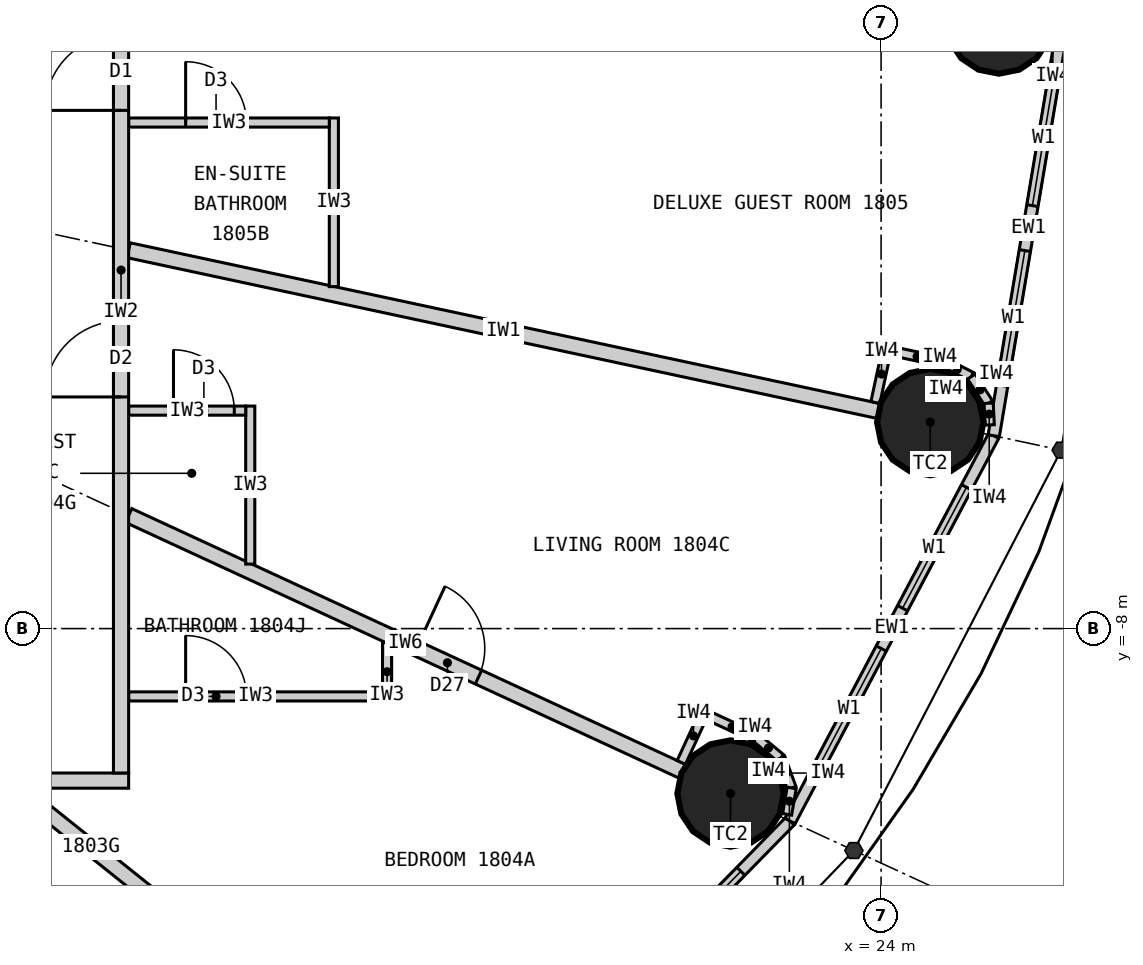
"""IFC4 building model, lengths in metres.
Left out: names, types, materials, properties, quantities, classifications, styles, units other than length and angle.
Written with IfcOpenShell. Run it as: python <this file> out.ifc"""

import sys

from ifc_helpers import new_model, si_unit, direction, frame, frame_2d, origin, origin_2d, place, context, subcontext, project, spatial, rectangle, circle, extrude, element, fill, save


model = new_model("IFC4")
c1 = context("Model", 3, precision=1e-05, world=origin(), true_north=direction((0.0, 1.0)))
c2 = subcontext(c1, "Body", "Model", "MODEL_VIEW")
j1 = project(units=[si_unit("LENGTHUNIT", "METRE"), si_unit("PLANEANGLEUNIT", "RADIAN")], contexts=[c1])
p1 = place(None, origin())
s1 = spatial("IfcSite", under=j1, at=p1, CompositionType="ELEMENT")
p2 = place(p1, origin())
s2 = spatial("IfcBuilding", under=s1, at=p2, CompositionType="ELEMENT")
p3 = place(p2, frame((0.0, 0.0, 73.8)))
s3 = spatial("IfcBuildingStorey", under=s2, at=p3, CompositionType="ELEMENT", Elevation=73.8)
for number, where, z_axis, x_axis in (
    (1, (25.55, 0.0, 0.0), (0.0, 0.0, 1.0), (1.0, 0.0, 0.0)),
    (2, (22.019, -10.17, 0.0), (0.0, 0.0, 1.0), (1.0, 0.0, 0.0)),
    (3, (24.647, -5.283, 0.0), (0.0, 0.0, 1.0), (1.0, 0.0, 0.0)),
):
    element("IfcColumn", number, at=place(p3, frame(where, z_axis=z_axis, x_axis=x_axis)), inside=s3, PredefinedType="COLUMN", context=c2, shape_type="SweptSolid", body=[
        extrude(circle(Radius=0.7, at=origin_2d()), origin(), (0.0, 0.0, 1.0), 3.3),
    ])
p4 = place(p3, frame((18.57, -14.856, 0.0), z_axis=(0.0, 0.0, 1.0), x_axis=(0.699602905915, 0.714531856557, 0.0)))
e4 = element("IfcWall", 4, at=p4, inside=s3, PredefinedType="ELEMENTEDWALL", context=c2, shape_type="SweptSolid", body=[
    extrude(rectangle(XDim=6.051, YDim=0.15, at=frame_2d((3.025, 0.0))), origin(), (0.0, 0.0, 1.0), 3.12),
])
p5 = place(p4, frame((0.926, 0.0, 0.9)))
e5 = element("IfcOpeningElement", 5, at=p5, cuts=e4, PredefinedType="OPENING", context=c2, shape_type="SweptSolid", body=[
    extrude(rectangle(XDim=1.8, YDim=1.9, at=frame_2d((0.9, 0.95))), frame((0.0, 0.085, 0.0), z_axis=(0.0, -1.0, 0.0), x_axis=(1.0, 0.0, 0.0)), (0.0, 0.0, 1.0), 0.17),
])
p6 = place(p4, frame((3.325, 0.0, 0.9)))
e6 = element("IfcOpeningElement", 6, at=p6, cuts=e4, PredefinedType="OPENING", context=c2, shape_type="SweptSolid", body=[
    extrude(rectangle(XDim=1.8, YDim=1.9, at=frame_2d((0.9, 0.95))), frame((0.0, 0.085, 0.0), z_axis=(0.0, -1.0, 0.0), x_axis=(1.0, 0.0, 0.0)), (0.0, 0.0, 1.0), 0.17),
])
p7 = place(p3, frame((22.803, -10.532, 0.0), z_axis=(0.0, 0.0, 1.0), x_axis=(0.467296867008, 0.884100468321, 0.0)))
e7 = element("IfcWall", 7, at=p7, inside=s3, PredefinedType="ELEMENTEDWALL", context=c2, shape_type="SweptSolid", body=[
    extrude(rectangle(XDim=5.734, YDim=0.15, at=frame_2d((2.867, 0.0))), origin(), (0.0, 0.0, 1.0), 3.12),
])
p8 = place(p7, frame((0.767, 0.0, 0.9)))
e8 = element("IfcOpeningElement", 8, at=p8, cuts=e7, PredefinedType="OPENING", context=c2, shape_type="SweptSolid", body=[
    extrude(rectangle(XDim=1.8, YDim=1.9, at=frame_2d((0.9, 0.95))), frame((0.0, 0.085, 0.0), z_axis=(0.0, -1.0, 0.0), x_axis=(1.0, 0.0, 0.0)), (0.0, 0.0, 1.0), 0.17),
])
p9 = place(p7, frame((3.167, 0.0, 0.9)))
e9 = element("IfcOpeningElement", 9, at=p9, cuts=e7, PredefinedType="OPENING", context=c2, shape_type="SweptSolid", body=[
    extrude(rectangle(XDim=1.8, YDim=1.9, at=frame_2d((0.9, 0.95))), frame((0.0, 0.085, 0.0), z_axis=(0.0, -1.0, 0.0), x_axis=(1.0, 0.0, 0.0)), (0.0, 0.0, 1.0), 0.17),
])
p10 = place(p3, frame((25.482, -5.462, 0.0), z_axis=(0.0, 0.0, 1.0), x_axis=(0.165642551694, 0.986185857264, 0.0)))
e10 = element("IfcWall", 10, at=p10, inside=s3, PredefinedType="ELEMENTEDWALL", context=c2, shape_type="SweptSolid", body=[
    extrude(rectangle(XDim=5.539, YDim=0.15, at=frame_2d((2.77, 0.0))), origin(), (0.0, 0.0, 1.0), 3.12),
])
p11 = place(p10, frame((0.669, 0.0, 0.9)))
e11 = element("IfcOpeningElement", 11, at=p11, cuts=e10, PredefinedType="OPENING", context=c2, shape_type="SweptSolid", body=[
    extrude(rectangle(XDim=1.8, YDim=1.9, at=frame_2d((0.9, 0.95))), frame((0.0, 0.085, 0.0), z_axis=(0.0, -1.0, 0.0), x_axis=(1.0, 0.0, 0.0)), (0.0, 0.0, 1.0), 0.17),
])
p12 = place(p10, frame((3.07, 0.0, 0.9)))
e12 = element("IfcOpeningElement", 12, at=p12, cuts=e10, PredefinedType="OPENING", context=c2, shape_type="SweptSolid", body=[
    extrude(rectangle(XDim=1.8, YDim=1.9, at=frame_2d((0.9, 0.95))), frame((0.0, 0.085, 0.0), z_axis=(0.0, -1.0, 0.0), x_axis=(1.0, 0.0, 0.0)), (0.0, 0.0, 1.0), 0.17),
])
p13 = place(p3, frame((14.1, -10.0, 0.0), z_axis=(0.0, 0.0, 1.0), x_axis=(-1.0, 0.0, 0.0)))
e13 = element("IfcWall", 13, at=p13, inside=s3, PredefinedType="PARTITIONING", context=c2, shape_type="SweptSolid", body=[
    extrude(rectangle(XDim=28.2, YDim=0.2, at=frame_2d((14.1, 0.0))), origin(), (0.0, 0.0, 1.0), 3.12),
])
p14 = place(p13, frame((24.165, 0.0, 0.0)))
e14 = element("IfcOpeningElement", 14, at=p14, cuts=e13, PredefinedType="OPENING", context=c2, shape_type="SweptSolid", body=[
    extrude(rectangle(XDim=1.0, YDim=2.2, at=frame_2d((0.5, 1.1))), frame((0.0, 0.11, 0.0), z_axis=(0.0, -1.0, 0.0), x_axis=(1.0, 0.0, 0.0)), (0.0, 0.0, 1.0), 0.22),
])
p15 = place(p13, frame((14.923, 0.0, 0.0)))
e15 = element("IfcOpeningElement", 15, at=p15, cuts=e13, PredefinedType="OPENING", context=c2, shape_type="SweptSolid", body=[
    extrude(rectangle(XDim=1.0, YDim=2.2, at=frame_2d((0.5, 1.1))), frame((0.0, 0.11, 0.0), z_axis=(0.0, -1.0, 0.0), x_axis=(1.0, 0.0, 0.0)), (0.0, 0.0, 1.0), 0.22),
])
p16 = place(p13, frame((3.035, 0.0, 0.0)))
e16 = element("IfcOpeningElement", 16, at=p16, cuts=e13, PredefinedType="OPENING", context=c2, shape_type="SweptSolid", body=[
    extrude(rectangle(XDim=1.0, YDim=2.2, at=frame_2d((0.5, 1.1))), frame((0.0, 0.11, 0.0), z_axis=(0.0, -1.0, 0.0), x_axis=(1.0, 0.0, 0.0)), (0.0, 0.0, 1.0), 0.22),
])
p17 = place(p3, frame((12.625, -10.1, 0.0), z_axis=(0.0, 0.0, 1.0), x_axis=(0.780892451574, -0.624665493744, 0.0)))
e17 = element("IfcWall", 17, at=p17, inside=s3, PredefinedType="PARTITIONING", context=c2, shape_type="SweptSolid", body=[
    extrude(rectangle(XDim=6.045, YDim=0.2, at=frame_2d((3.022, 0.0))), origin(), (0.0, 0.0, 1.0), 2.32),
])
p18 = place(p3, frame((14.1, -6.512, 0.0), z_axis=(0.0, 0.0, 1.0), x_axis=(0.907832871056, -0.419332181247, 0.0)))
e18 = element("IfcWall", 18, at=p18, inside=s3, PredefinedType="PARTITIONING", context=c2, shape_type="SweptSolid", body=[
    extrude(rectangle(XDim=8.023, YDim=0.2, at=frame_2d((4.011, 0.0))), origin(), (0.0, 0.0, 1.0), 2.32),
])
p19 = place(p18, frame((4.17, 0.0, 0.0)))
e19 = element("IfcOpeningElement", 19, at=p19, cuts=e18, PredefinedType="OPENING", context=c2, shape_type="SweptSolid", body=[
    extrude(rectangle(XDim=0.9, YDim=2.1, at=frame_2d((0.45, 1.05))), frame((0.0, 0.11, 0.0), z_axis=(0.0, -1.0, 0.0), x_axis=(1.0, 0.0, 0.0)), (0.0, 0.0, 1.0), 0.22),
])
p20 = place(p3, frame((14.1, -3.022, 0.0), z_axis=(0.0, 0.0, 1.0), x_axis=(0.977790014929, -0.209586943072, 0.0)))
e20 = element("IfcWall", 20, at=p20, inside=s3, PredefinedType="PARTITIONING", context=c2, shape_type="SweptSolid", body=[
    extrude(rectangle(XDim=10.087, YDim=0.2, at=frame_2d((5.043, 0.0))), origin(), (0.0, 0.0, 1.0), 2.32),
])
p21 = place(p3, frame((17.5, -8.183, 0.0), z_axis=(0.0, 0.0, 1.0), x_axis=(0.0, -1.0, 0.0)))
e21 = element("IfcWall", 21, at=p21, inside=s3, PredefinedType="PARTITIONING", context=c2, shape_type="SweptSolid", body=[
    extrude(rectangle(XDim=0.77, YDim=0.12, at=frame_2d((0.385, 0.0))), origin(), (0.0, 0.0, 1.0), 3.12),
])
p22 = place(p3, frame((14.1, -8.893, 0.0), z_axis=(0.0, 0.0, 1.0), x_axis=(1.0, 0.0, 0.0)))
e22 = element("IfcWall", 22, at=p22, inside=s3, PredefinedType="PARTITIONING", context=c2, shape_type="SweptSolid", body=[
    extrude(rectangle(XDim=3.34, YDim=0.12, at=frame_2d((1.67, 0.0))), origin(), (0.0, 0.0, 1.0), 3.12),
])
p23 = place(p22, frame((0.75, 0.0, 0.0)))
e23 = element("IfcOpeningElement", 23, at=p23, cuts=e22, PredefinedType="OPENING", context=c2, shape_type="SweptSolid", body=[
    extrude(rectangle(XDim=0.8, YDim=2.1, at=frame_2d((0.4, 1.05))), frame((0.0, 0.07, 0.0), z_axis=(0.0, -1.0, 0.0), x_axis=(1.0, 0.0, 0.0)), (0.0, 0.0, 1.0), 0.14),
])
p24 = place(p3, frame((15.7, -7.152, 0.0), z_axis=(0.0, 0.0, 1.0), x_axis=(0.0, 1.0, 0.0)))
e24 = element("IfcWall", 24, at=p24, inside=s3, PredefinedType="PARTITIONING", context=c2, shape_type="SweptSolid", body=[
    extrude(rectangle(XDim=2.079, YDim=0.12, at=frame_2d((1.04, 0.0))), origin(), (0.0, 0.0, 1.0), 3.12),
])
p25 = place(p3, frame((14.1, -5.133, 0.0), z_axis=(0.0, 0.0, 1.0), x_axis=(1.0, 0.0, 0.0)))
e25 = element("IfcWall", 25, at=p25, inside=s3, PredefinedType="PARTITIONING", context=c2, shape_type="SweptSolid", body=[
    extrude(rectangle(XDim=1.54, YDim=0.12, at=frame_2d((0.77, 0.0))), origin(), (0.0, 0.0, 1.0), 3.12),
])
p26 = place(p25, frame((0.59, 0.0, 0.0)))
e26 = element("IfcOpeningElement", 26, at=p26, cuts=e25, PredefinedType="OPENING", context=c2, shape_type="SweptSolid", body=[
    extrude(rectangle(XDim=0.8, YDim=2.1, at=frame_2d((0.4, 1.05))), frame((0.0, 0.07, 0.0), z_axis=(0.0, -1.0, 0.0), x_axis=(1.0, 0.0, 0.0)), (0.0, 0.0, 1.0), 0.14),
])
p27 = place(p3, frame((16.8, -3.501, 0.0), z_axis=(0.0, 0.0, 1.0), x_axis=(0.0, 1.0, 0.0)))
e27 = element("IfcWall", 27, at=p27, inside=s3, PredefinedType="PARTITIONING", context=c2, shape_type="SweptSolid", body=[
    extrude(rectangle(XDim=2.219, YDim=0.12, at=frame_2d((1.109, 0.0))), origin(), (0.0, 0.0, 1.0), 3.12),
])
p28 = place(p3, frame((14.1, -1.343, 0.0), z_axis=(0.0, 0.0, 1.0), x_axis=(1.0, 0.0, 0.0)))
e28 = element("IfcWall", 28, at=p28, inside=s3, PredefinedType="PARTITIONING", context=c2, shape_type="SweptSolid", body=[
    extrude(rectangle(XDim=2.64, YDim=0.12, at=frame_2d((1.32, 0.0))), origin(), (0.0, 0.0, 1.0), 3.12),
])
p29 = place(p28, frame((0.75, 0.0, 0.0)))
e29 = element("IfcOpeningElement", 29, at=p29, cuts=e28, PredefinedType="OPENING", context=c2, shape_type="SweptSolid", body=[
    extrude(rectangle(XDim=0.8, YDim=2.1, at=frame_2d((0.4, 1.05))), frame((0.0, 0.07, 0.0), z_axis=(0.0, -1.0, 0.0), x_axis=(1.0, 0.0, 0.0)), (0.0, 0.0, 1.0), 0.14),
])
p30 = place(p3, frame((14.0, -9.9, 0.0), z_axis=(0.0, 0.0, 1.0), x_axis=(0.0, 1.0, 0.0)))
e30 = element("IfcWall", 30, at=p30, inside=s3, PredefinedType="PARTITIONING", context=c2, shape_type="SweptSolid", body=[
    extrude(rectangle(XDim=13.232, YDim=0.2, at=frame_2d((6.616, 0.0))), origin(), (0.0, 0.0, 1.0), 3.12),
])
p31 = place(p30, frame((4.948, 0.0, 0.0)))
e31 = element("IfcOpeningElement", 31, at=p31, cuts=e30, PredefinedType="OPENING", context=c2, shape_type="SweptSolid", body=[
    extrude(rectangle(XDim=1.0, YDim=2.2, at=frame_2d((0.5, 1.1))), frame((0.0, 0.11, 0.0), z_axis=(0.0, -1.0, 0.0), x_axis=(1.0, 0.0, 0.0)), (0.0, 0.0, 1.0), 0.22),
])
p32 = place(p30, frame((8.718, 0.0, 0.0)))
e32 = element("IfcOpeningElement", 32, at=p32, cuts=e30, PredefinedType="OPENING", context=c2, shape_type="SweptSolid", body=[
    extrude(rectangle(XDim=1.0, YDim=2.2, at=frame_2d((0.5, 1.1))), frame((0.0, 0.11, 0.0), z_axis=(0.0, -1.0, 0.0), x_axis=(1.0, 0.0, 0.0)), (0.0, 0.0, 1.0), 0.22),
])
p33 = place(p30, frame((11.74, 0.0, 0.0)))
e33 = element("IfcOpeningElement", 33, at=p33, cuts=e30, PredefinedType="OPENING", context=c2, shape_type="SweptSolid", body=[
    extrude(rectangle(XDim=1.0, YDim=2.2, at=frame_2d((0.5, 1.1))), frame((0.0, 0.11, 0.0), z_axis=(0.0, -1.0, 0.0), x_axis=(1.0, 0.0, 0.0)), (0.0, 0.0, 1.0), 0.22),
])
p34 = place(p3, frame((21.371, -9.761, 0.0), z_axis=(0.0, 0.0, 1.0), x_axis=(0.419259891039, 0.907866258744, 0.0)))
e34 = element("IfcWall", 34, at=p34, inside=s3, PredefinedType="PARTITIONING", context=c2, shape_type="SweptSolid", body=[
    extrude(rectangle(XDim=0.768, YDim=0.12, at=frame_2d((0.384, 0.0))), origin(), (0.0, 0.0, 1.0), 3.12),
])
p35 = place(p3, frame((21.722, -9.144, 0.0), z_axis=(0.0, 0.0, 1.0), x_axis=(0.907877701396, -0.419235112208, 0.0)))
e35 = element("IfcWall", 35, at=p35, inside=s3, PredefinedType="PARTITIONING", context=c2, shape_type="SweptSolid", body=[
    extrude(rectangle(XDim=0.7, YDim=0.12, at=frame_2d((0.35, 0.0))), origin(), (0.0, 0.0, 1.0), 3.12),
])
p36 = place(p3, frame((22.358, -9.437, 0.0), z_axis=(0.0, 0.0, 1.0), x_axis=(0.768412687942, -0.639954639806, 0.0)))
e36 = element("IfcWall", 36, at=p36, inside=s3, PredefinedType="PARTITIONING", context=c2, shape_type="SweptSolid", body=[
    extrude(rectangle(XDim=0.418, YDim=0.12, at=frame_2d((0.209, 0.0))), origin(), (0.0, 0.0, 1.0), 3.12),
])
p37 = place(p3, frame((22.679, -9.705, 0.0), z_axis=(0.0, 0.0, 1.0), x_axis=(0.345164001646, -0.938542386879, 0.0)))
e37 = element("IfcWall", 37, at=p37, inside=s3, PredefinedType="PARTITIONING", context=c2, shape_type="SweptSolid", body=[
    extrude(rectangle(XDim=0.418, YDim=0.12, at=frame_2d((0.209, 0.0))), origin(), (0.0, 0.0, 1.0), 3.12),
])
p38 = place(p3, frame((22.823, -10.097, 0.0), z_axis=(0.0, 0.0, 1.0), x_axis=(-0.169674995186, -0.985500074079, 0.0)))
e38 = element("IfcWall", 38, at=p38, inside=s3, PredefinedType="PARTITIONING", context=c2, shape_type="SweptSolid", body=[
    extrude(rectangle(XDim=0.353, YDim=0.12, at=frame_2d((0.176, 0.0))), origin(), (0.0, 0.0, 1.0), 3.12),
])
p39 = place(p3, frame((23.925, -5.026, 0.0), z_axis=(0.0, 0.0, 1.0), x_axis=(0.209681192172, 0.977769808109, 0.0)))
e39 = element("IfcWall", 39, at=p39, inside=s3, PredefinedType="PARTITIONING", context=c2, shape_type="SweptSolid", body=[
    extrude(rectangle(XDim=0.767, YDim=0.12, at=frame_2d((0.384, 0.0))), origin(), (0.0, 0.0, 1.0), 3.12),
])
p40 = place(p3, frame((24.132, -4.347, 0.0), z_axis=(0.0, 0.0, 1.0), x_axis=(0.977776882509, -0.209648200638, 0.0)))
e40 = element("IfcWall", 40, at=p40, inside=s3, PredefinedType="PARTITIONING", context=c2, shape_type="SweptSolid", body=[
    extrude(rectangle(XDim=0.7, YDim=0.12, at=frame_2d((0.35, 0.0))), origin(), (0.0, 0.0, 1.0), 3.12),
])
for number, where, z_axis, x_axis in (
    (41, (24.816, -4.494, 0.0), (0.0, 0.0, 1.0), (0.89, -0.455, 0.0)),
    (42, (25.188, -4.684, 0.0), (0.0, 0.0, 1.0), (0.543, -0.84, 0.0)),
):
    element("IfcWall", number, at=place(p3, frame(where, z_axis=z_axis, x_axis=x_axis)), inside=s3, PredefinedType="PARTITIONING", context=c2, shape_type="SweptSolid", body=[
        extrude(rectangle(XDim=0.418, YDim=0.12, at=frame_2d((0.209, 0.0))), origin(), (0.0, 0.0, 1.0), 3.12),
    ])
p41 = place(p3, frame((25.416, -5.035, 0.0), z_axis=(0.0, 0.0, 1.0), x_axis=(0.050406329159, -0.998728793007, 0.0)))
e43 = element("IfcWall", 43, at=p41, inside=s3, PredefinedType="PARTITIONING", context=c2, shape_type="SweptSolid", body=[
    extrude(rectangle(XDim=0.286, YDim=0.12, at=frame_2d((0.143, 0.0))), origin(), (0.0, 0.0, 1.0), 3.12),
])
p42 = place(p6, origin())
e44 = element("IfcWindow", 44, at=p42, inside=s3, PartitioningType="SINGLE_PANEL", PredefinedType="WINDOW", context=c2, shape_type="SweptSolid", body=[
    extrude(rectangle(XDim=1.8, YDim=1.9, at=frame_2d((0.9, 0.95))), frame((0.0, 0.03, 0.0), z_axis=(0.0, -1.0, 0.0), x_axis=(1.0, 0.0, 0.0)), (0.0, 0.0, 1.0), 0.06),
])
fill(e6, e44)
p43 = place(p8, origin())
e45 = element("IfcWindow", 45, at=p43, inside=s3, PartitioningType="SINGLE_PANEL", PredefinedType="WINDOW", context=c2, shape_type="SweptSolid", body=[
    extrude(rectangle(XDim=1.8, YDim=1.9, at=frame_2d((0.9, 0.95))), frame((0.0, 0.03, 0.0), z_axis=(0.0, -1.0, 0.0), x_axis=(1.0, 0.0, 0.0)), (0.0, 0.0, 1.0), 0.06),
])
fill(e8, e45)
p44 = place(p9, origin())
e46 = element("IfcWindow", 46, at=p44, inside=s3, PartitioningType="SINGLE_PANEL", PredefinedType="WINDOW", context=c2, shape_type="SweptSolid", body=[
    extrude(rectangle(XDim=1.8, YDim=1.9, at=frame_2d((0.9, 0.95))), frame((0.0, 0.03, 0.0), z_axis=(0.0, -1.0, 0.0), x_axis=(1.0, 0.0, 0.0)), (0.0, 0.0, 1.0), 0.06),
])
fill(e9, e46)
p45 = place(p11, origin())
e47 = element("IfcWindow", 47, at=p45, inside=s3, PartitioningType="SINGLE_PANEL", PredefinedType="WINDOW", context=c2, shape_type="SweptSolid", body=[
    extrude(rectangle(XDim=1.8, YDim=1.9, at=frame_2d((0.9, 0.95))), frame((0.0, 0.03, 0.0), z_axis=(0.0, -1.0, 0.0), x_axis=(1.0, 0.0, 0.0)), (0.0, 0.0, 1.0), 0.06),
])
fill(e11, e47)
p46 = place(p12, origin())
e48 = element("IfcWindow", 48, at=p46, inside=s3, PartitioningType="SINGLE_PANEL", PredefinedType="WINDOW", context=c2, shape_type="SweptSolid", body=[
    extrude(rectangle(XDim=1.8, YDim=1.9, at=frame_2d((0.9, 0.95))), frame((0.0, 0.03, 0.0), z_axis=(0.0, -1.0, 0.0), x_axis=(1.0, 0.0, 0.0)), (0.0, 0.0, 1.0), 0.06),
])
fill(e12, e48)
p47 = place(p23, origin())
e49 = element("IfcDoor", 49, at=p47, inside=s3, OperationType="SINGLE_SWING_LEFT", PredefinedType="DOOR", context=c2, shape_type="SweptSolid", body=[
    extrude(rectangle(XDim=0.8, YDim=2.1, at=frame_2d((0.4, 1.05))), frame((0.0, 0.025, 0.0), z_axis=(0.0, -1.0, 0.0), x_axis=(1.0, 0.0, 0.0)), (0.0, 0.0, 1.0), 0.05),
])
fill(e23, e49)
p48 = place(p26, origin())
e50 = element("IfcDoor", 50, at=p48, inside=s3, OperationType="SINGLE_SWING_LEFT", PredefinedType="DOOR", context=c2, shape_type="SweptSolid", body=[
    extrude(rectangle(XDim=0.8, YDim=2.1, at=frame_2d((0.4, 1.05))), frame((0.0, 0.025, 0.0), z_axis=(0.0, -1.0, 0.0), x_axis=(1.0, 0.0, 0.0)), (0.0, 0.0, 1.0), 0.05),
])
fill(e26, e50)
p49 = place(p31, origin())
e51 = element("IfcDoor", 51, at=p49, inside=s3, OperationType="SINGLE_SWING_LEFT", PredefinedType="DOOR", context=c2, shape_type="SweptSolid", body=[
    extrude(rectangle(XDim=1.0, YDim=2.2, at=frame_2d((0.5, 1.1))), frame((0.0, 0.025, 0.0), z_axis=(0.0, -1.0, 0.0), x_axis=(1.0, 0.0, 0.0)), (0.0, 0.0, 1.0), 0.05),
])
fill(e31, e51)
p50 = place(p19, origin())
e52 = element("IfcDoor", 52, at=p50, inside=s3, OperationType="SINGLE_SWING_LEFT", PredefinedType="DOOR", context=c2, shape_type="SweptSolid", body=[
    extrude(rectangle(XDim=0.9, YDim=2.1, at=frame_2d((0.45, 1.05))), frame((0.0, 0.025, 0.0), z_axis=(0.0, -1.0, 0.0), x_axis=(1.0, 0.0, 0.0)), (0.0, 0.0, 1.0), 0.05),
])
fill(e19, e52)
p51 = place(p29, origin())
e53 = element("IfcDoor", 53, at=p51, inside=s3, OperationType="SINGLE_SWING_LEFT", PredefinedType="DOOR", context=c2, shape_type="SweptSolid", body=[
    extrude(rectangle(XDim=0.8, YDim=2.1, at=frame_2d((0.4, 1.05))), frame((0.0, 0.025, 0.0), z_axis=(0.0, -1.0, 0.0), x_axis=(1.0, 0.0, 0.0)), (0.0, 0.0, 1.0), 0.05),
])
fill(e29, e53)
p52 = place(p32, origin())
e54 = element("IfcDoor", 54, at=p52, inside=s3, OperationType="SINGLE_SWING_LEFT", PredefinedType="DOOR", context=c2, shape_type="SweptSolid", body=[
    extrude(rectangle(XDim=1.0, YDim=2.2, at=frame_2d((0.5, 1.1))), frame((0.0, 0.025, 0.0), z_axis=(0.0, -1.0, 0.0), x_axis=(1.0, 0.0, 0.0)), (0.0, 0.0, 1.0), 0.05),
])
fill(e32, e54)
save(model, sys.argv[1])
